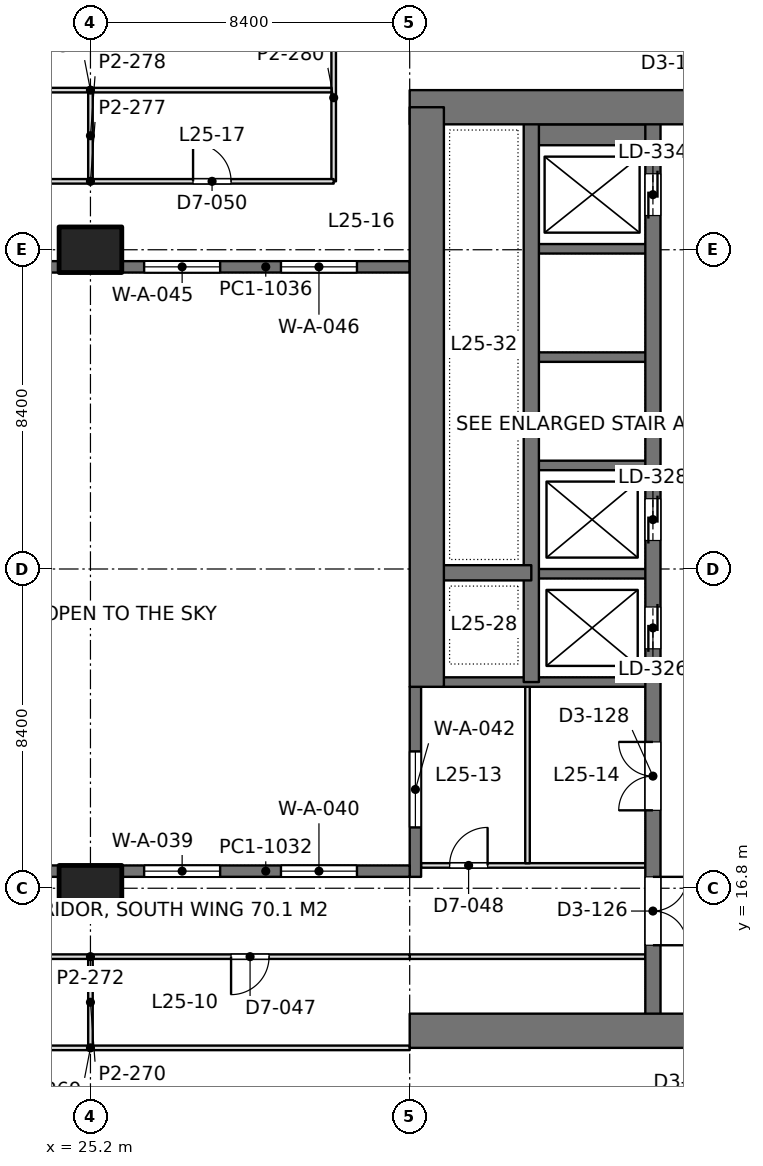
"""IFC4 building model, lengths in metres.
Left out: names, types, materials, properties, quantities, classifications, styles, units other than length and angle.
Written with IfcOpenShell. Run it as: python <this file> out.ifc"""

import sys

from ifc_helpers import new_model, si_unit, direction, frame, frame_2d, origin, origin_2d, place, context, subcontext, project, spatial, rectangle, extrude, element, fill, save


model = new_model("IFC4")
c1 = context("Model", 3, precision=1e-05, world=origin(), true_north=direction((0.0, 1.0)))
c2 = subcontext(c1, "Body", "Model", "MODEL_VIEW")
j1 = project(units=[si_unit("LENGTHUNIT", "METRE"), si_unit("PLANEANGLEUNIT", "RADIAN")], contexts=[c1])
p1 = place(None, origin())
s1 = spatial("IfcSite", under=j1, at=p1, CompositionType="ELEMENT")
p2 = place(p1, origin())
s2 = spatial("IfcBuilding", under=s1, at=p2, CompositionType="ELEMENT")
p3 = place(p2, frame((0.0, 0.0, 113.4)))
s3 = spatial("IfcBuildingStorey", under=s2, at=p3, CompositionType="ELEMENT", Elevation=113.4)
for number, where, z_axis, x_axis in (
    (1, (25.2, 16.8, 0.0), (0.0, 0.0, 1.0), (1.0, 0.0, 0.0)),
    (2, (25.2, 33.6, 0.0), (0.0, 0.0, 1.0), (1.0, 0.0, 0.0)),
):
    element("IfcColumn", number, at=place(p3, frame(where, z_axis=z_axis, x_axis=x_axis)), inside=s3, PredefinedType="COLUMN", context=c2, shape_type="SweptSolid", body=[
        extrude(rectangle(XDim=1.65, YDim=1.2, at=origin_2d()), origin(), (0.0, 0.0, 1.0), 4.2),
    ])
p4 = place(p3, frame((33.6, 13.05, 0.0), z_axis=(0.0, 0.0, 1.0), x_axis=(1.0, 0.0, 0.0)))
e3 = element("IfcWall", 3, at=p4, inside=s3, PredefinedType="SHEAR", context=c2, shape_type="SweptSolid", body=[
    extrude(rectangle(XDim=18.0, YDim=0.9, at=frame_2d((9.0, 0.0))), origin(), (0.0, 0.0, 1.0), 4.2),
])
p5 = place(p4, frame((7.25, 0.0, 0.0)))
e4 = element("IfcOpeningElement", 4, at=p5, cuts=e3, PredefinedType="OPENING", context=c2, shape_type="SweptSolid", body=[
    extrude(rectangle(XDim=1.8, YDim=2.4, at=frame_2d((0.9, 1.2))), frame((0.0, 0.46, 0.0), z_axis=(0.0, -1.0, 0.0), x_axis=(1.0, 0.0, 0.0)), (0.0, 0.0, 1.0), 0.92),
])
p6 = place(p3, frame((33.6, 37.35, 0.0), z_axis=(0.0, 0.0, 1.0), x_axis=(1.0, 0.0, 0.0)))
e5 = element("IfcWall", 5, at=p6, inside=s3, PredefinedType="SHEAR", context=c2, shape_type="SweptSolid", body=[
    extrude(rectangle(XDim=18.0, YDim=0.9, at=frame_2d((9.0, 0.0))), origin(), (0.0, 0.0, 1.0), 4.2),
])
p7 = place(p6, frame((7.25, 0.0, 0.0)))
e6 = element("IfcOpeningElement", 6, at=p7, cuts=e5, PredefinedType="OPENING", context=c2, shape_type="SweptSolid", body=[
    extrude(rectangle(XDim=1.8, YDim=2.4, at=frame_2d((0.9, 1.2))), frame((0.0, 0.46, 0.0), z_axis=(0.0, -1.0, 0.0), x_axis=(1.0, 0.0, 0.0)), (0.0, 0.0, 1.0), 0.92),
])
p8 = place(p3, frame((34.05, 22.1, 0.0), z_axis=(0.0, 0.0, 1.0), x_axis=(0.0, 1.0, 0.0)))
e7 = element("IfcWall", 7, at=p8, inside=s3, PredefinedType="SHEAR", context=c2, shape_type="SweptSolid", body=[
    extrude(rectangle(XDim=15.25, YDim=0.9, at=frame_2d((7.625, 0.0))), origin(), (0.0, 0.0, 1.0), 4.2),
])
p9 = place(p3, frame((40.0, 13.05, 0.0), z_axis=(0.0, 0.0, 1.0), x_axis=(0.0, 1.0, 0.0)))
e8 = element("IfcWall", 8, at=p9, inside=s3, PredefinedType="SHEAR", context=c2, shape_type="SweptSolid", body=[
    extrude(rectangle(XDim=24.3, YDim=0.4, at=frame_2d((12.15, 0.0))), origin(), (0.0, 0.0, 1.0), 4.2),
])
p10 = place(p9, frame((10.05, 0.0, 0.0)))
e9 = element("IfcOpeningElement", 9, at=p10, cuts=e8, PredefinedType="OPENING", context=c2, shape_type="SweptSolid", body=[
    extrude(rectangle(XDim=1.1, YDim=2.2, at=frame_2d((0.55, 1.1))), frame((0.0, 0.21, 0.0), z_axis=(0.0, -1.0, 0.0), x_axis=(1.0, 0.0, 0.0)), (0.0, 0.0, 1.0), 0.42),
])
p11 = place(p9, frame((12.9, 0.0, 0.0)))
e10 = element("IfcOpeningElement", 10, at=p11, cuts=e8, PredefinedType="OPENING", context=c2, shape_type="SweptSolid", body=[
    extrude(rectangle(XDim=1.1, YDim=2.2, at=frame_2d((0.55, 1.1))), frame((0.0, 0.21, 0.0), z_axis=(0.0, -1.0, 0.0), x_axis=(1.0, 0.0, 0.0)), (0.0, 0.0, 1.0), 0.42),
])
p12 = place(p9, frame((21.45, 0.0, 0.0)))
e11 = element("IfcOpeningElement", 11, at=p12, cuts=e8, PredefinedType="OPENING", context=c2, shape_type="SweptSolid", body=[
    extrude(rectangle(XDim=1.1, YDim=2.2, at=frame_2d((0.55, 1.1))), frame((0.0, 0.21, 0.0), z_axis=(0.0, -1.0, 0.0), x_axis=(1.0, 0.0, 0.0)), (0.0, 0.0, 1.0), 0.42),
])
p13 = place(p9, frame((2.25, 0.0, 0.0)))
e12 = element("IfcOpeningElement", 12, at=p13, cuts=e8, PredefinedType="OPENING", context=c2, shape_type="SweptSolid", body=[
    extrude(rectangle(XDim=1.8, YDim=2.4, at=frame_2d((0.9, 1.2))), frame((0.0, 0.21, 0.0), z_axis=(0.0, -1.0, 0.0), x_axis=(1.0, 0.0, 0.0)), (0.0, 0.0, 1.0), 0.42),
])
p14 = place(p9, frame((5.8, 0.0, 0.0)))
e13 = element("IfcOpeningElement", 13, at=p14, cuts=e8, PredefinedType="OPENING", context=c2, shape_type="SweptSolid", body=[
    extrude(rectangle(XDim=1.8, YDim=2.4, at=frame_2d((0.9, 1.2))), frame((0.0, 0.21, 0.0), z_axis=(0.0, -1.0, 0.0), x_axis=(1.0, 0.0, 0.0)), (0.0, 0.0, 1.0), 0.42),
])
p15 = place(p3, frame((36.8, 22.225, 0.0), z_axis=(0.0, 0.0, 1.0), x_axis=(0.0, 1.0, 0.0)))
e14 = element("IfcWall", 14, at=p15, inside=s3, PredefinedType="SHEAR", context=c2, shape_type="SweptSolid", body=[
    extrude(rectangle(XDim=15.125, YDim=0.4, at=frame_2d((7.562, 0.0))), origin(), (0.0, 0.0, 1.0), 4.2),
])
p16 = place(p3, frame((36.8, 25.1, 0.0), z_axis=(0.0, 0.0, 1.0), x_axis=(-1.0, 0.0, 0.0)))
e15 = element("IfcWall", 15, at=p16, inside=s3, PredefinedType="SHEAR", context=c2, shape_type="SweptSolid", body=[
    extrude(rectangle(XDim=2.75, YDim=0.4, at=frame_2d((1.375, 0.0))), origin(), (0.0, 0.0, 1.0), 4.2),
])
p17 = place(p3, frame((40.0, 22.225, 0.0), z_axis=(0.0, 0.0, 1.0), x_axis=(-1.0, 0.0, 0.0)))
e16 = element("IfcWall", 16, at=p17, inside=s3, PredefinedType="SHEAR", context=c2, shape_type="SweptSolid", body=[
    extrude(rectangle(XDim=5.95, YDim=0.25, at=frame_2d((2.975, 0.0))), origin(), (0.0, 0.0, 1.0), 4.2),
])
for number, where, z_axis, x_axis in (
    (17, (40.0, 25.075, 0.0), (0.0, 0.0, 1.0), (-1.0, 0.0, 0.0)),
    (18, (40.0, 27.925, 0.0), (0.0, 0.0, 1.0), (-1.0, 0.0, 0.0)),
    (19, (40.0, 30.775, 0.0), (0.0, 0.0, 1.0), (-1.0, 0.0, 0.0)),
    (20, (40.0, 33.625, 0.0), (0.0, 0.0, 1.0), (-1.0, 0.0, 0.0)),
):
    element("IfcWall", number, at=place(p3, frame(where, z_axis=z_axis, x_axis=x_axis)), inside=s3, PredefinedType="SHEAR", context=c2, shape_type="SweptSolid", body=[
        extrude(rectangle(XDim=3.2, YDim=0.25, at=frame_2d((1.6, 0.0))), origin(), (0.0, 0.0, 1.0), 4.2),
    ])
p18 = place(p3, frame((40.0, 36.625, 0.0), z_axis=(0.0, 0.0, 1.0), x_axis=(-1.0, 0.0, 0.0)))
e21 = element("IfcWall", 21, at=p18, inside=s3, PredefinedType="SHEAR", context=c2, shape_type="SweptSolid", body=[
    extrude(rectangle(XDim=3.2, YDim=0.55, at=frame_2d((1.6, 0.0))), origin(), (0.0, 0.0, 1.0), 4.2),
])
p19 = place(p3, frame((33.75, 17.1, 0.0), z_axis=(0.0, 0.0, 1.0), x_axis=(0.0, 1.0, 0.0)))
e22 = element("IfcWall", 22, at=p19, inside=s3, PredefinedType="SOLIDWALL", context=c2, shape_type="SweptSolid", body=[
    extrude(rectangle(XDim=5.0, YDim=0.3, at=frame_2d((2.5, 0.0))), origin(), (0.0, 0.0, 1.0), 4.05),
])
p20 = place(p19, frame((1.3, 0.0, 0.1)))
e23 = element("IfcOpeningElement", 23, at=p20, cuts=e22, PredefinedType="OPENING", context=c2, shape_type="SweptSolid", body=[
    extrude(rectangle(XDim=2.0, YDim=3.0, at=frame_2d((1.0, 1.5))), frame((0.0, 0.16, 0.0), z_axis=(0.0, -1.0, 0.0), x_axis=(1.0, 0.0, 0.0)), (0.0, 0.0, 1.0), 0.32),
])
p21 = place(p3, frame((16.8, 17.25, 0.0), z_axis=(0.0, 0.0, 1.0), x_axis=(1.0, 0.0, 0.0)))
e24 = element("IfcWall", 24, at=p21, inside=s3, PredefinedType="SOLIDWALL", context=c2, shape_type="SweptSolid", body=[
    extrude(rectangle(XDim=7.575, YDim=0.3, at=frame_2d((3.788, 0.0))), origin(), (0.0, 0.0, 1.0), 4.05),
])
p22 = place(p21, frame((0.988, 0.0, 0.1)))
e25 = element("IfcOpeningElement", 25, at=p22, cuts=e24, PredefinedType="OPENING", context=c2, shape_type="SweptSolid", body=[
    extrude(rectangle(XDim=2.0, YDim=3.0, at=frame_2d((1.0, 1.5))), frame((0.0, 0.16, 0.0), z_axis=(0.0, -1.0, 0.0), x_axis=(1.0, 0.0, 0.0)), (0.0, 0.0, 1.0), 0.32),
])
p23 = place(p21, frame((4.587, 0.0, 0.1)))
e26 = element("IfcOpeningElement", 26, at=p23, cuts=e24, PredefinedType="OPENING", context=c2, shape_type="SweptSolid", body=[
    extrude(rectangle(XDim=2.0, YDim=3.0, at=frame_2d((1.0, 1.5))), frame((0.0, 0.16, 0.0), z_axis=(0.0, -1.0, 0.0), x_axis=(1.0, 0.0, 0.0)), (0.0, 0.0, 1.0), 0.32),
])
p24 = place(p3, frame((26.025, 17.25, 0.0), z_axis=(0.0, 0.0, 1.0), x_axis=(1.0, 0.0, 0.0)))
e27 = element("IfcWall", 27, at=p24, inside=s3, PredefinedType="SOLIDWALL", context=c2, shape_type="SweptSolid", body=[
    extrude(rectangle(XDim=7.575, YDim=0.3, at=frame_2d((3.788, 0.0))), origin(), (0.0, 0.0, 1.0), 4.05),
])
p25 = place(p24, frame((0.587, 0.0, 0.1)))
e28 = element("IfcOpeningElement", 28, at=p25, cuts=e27, PredefinedType="OPENING", context=c2, shape_type="SweptSolid", body=[
    extrude(rectangle(XDim=2.0, YDim=3.0, at=frame_2d((1.0, 1.5))), frame((0.0, 0.16, 0.0), z_axis=(0.0, -1.0, 0.0), x_axis=(1.0, 0.0, 0.0)), (0.0, 0.0, 1.0), 0.32),
])
p26 = place(p24, frame((4.188, 0.0, 0.1)))
e29 = element("IfcOpeningElement", 29, at=p26, cuts=e27, PredefinedType="OPENING", context=c2, shape_type="SweptSolid", body=[
    extrude(rectangle(XDim=2.0, YDim=3.0, at=frame_2d((1.0, 1.5))), frame((0.0, 0.16, 0.0), z_axis=(0.0, -1.0, 0.0), x_axis=(1.0, 0.0, 0.0)), (0.0, 0.0, 1.0), 0.32),
])
p27 = place(p3, frame((16.8, 33.15, 0.0), z_axis=(0.0, 0.0, 1.0), x_axis=(1.0, 0.0, 0.0)))
e30 = element("IfcWall", 30, at=p27, inside=s3, PredefinedType="SOLIDWALL", context=c2, shape_type="SweptSolid", body=[
    extrude(rectangle(XDim=7.575, YDim=0.3, at=frame_2d((3.788, 0.0))), origin(), (0.0, 0.0, 1.0), 4.05),
])
p28 = place(p27, frame((0.988, 0.0, 0.1)))
e31 = element("IfcOpeningElement", 31, at=p28, cuts=e30, PredefinedType="OPENING", context=c2, shape_type="SweptSolid", body=[
    extrude(rectangle(XDim=2.0, YDim=3.0, at=frame_2d((1.0, 1.5))), frame((0.0, 0.16, 0.0), z_axis=(0.0, -1.0, 0.0), x_axis=(1.0, 0.0, 0.0)), (0.0, 0.0, 1.0), 0.32),
])
p29 = place(p27, frame((4.587, 0.0, 0.1)))
e32 = element("IfcOpeningElement", 32, at=p29, cuts=e30, PredefinedType="OPENING", context=c2, shape_type="SweptSolid", body=[
    extrude(rectangle(XDim=2.0, YDim=3.0, at=frame_2d((1.0, 1.5))), frame((0.0, 0.16, 0.0), z_axis=(0.0, -1.0, 0.0), x_axis=(1.0, 0.0, 0.0)), (0.0, 0.0, 1.0), 0.32),
])
p30 = place(p3, frame((26.025, 33.15, 0.0), z_axis=(0.0, 0.0, 1.0), x_axis=(1.0, 0.0, 0.0)))
e33 = element("IfcWall", 33, at=p30, inside=s3, PredefinedType="SOLIDWALL", context=c2, shape_type="SweptSolid", body=[
    extrude(rectangle(XDim=7.575, YDim=0.3, at=frame_2d((3.788, 0.0))), origin(), (0.0, 0.0, 1.0), 4.05),
])
p31 = place(p30, frame((0.587, 0.0, 0.1)))
e34 = element("IfcOpeningElement", 34, at=p31, cuts=e33, PredefinedType="OPENING", context=c2, shape_type="SweptSolid", body=[
    extrude(rectangle(XDim=2.0, YDim=3.0, at=frame_2d((1.0, 1.5))), frame((0.0, 0.16, 0.0), z_axis=(0.0, -1.0, 0.0), x_axis=(1.0, 0.0, 0.0)), (0.0, 0.0, 1.0), 0.32),
])
p32 = place(p30, frame((4.188, 0.0, 0.1)))
e35 = element("IfcOpeningElement", 35, at=p32, cuts=e33, PredefinedType="OPENING", context=c2, shape_type="SweptSolid", body=[
    extrude(rectangle(XDim=2.0, YDim=3.0, at=frame_2d((1.0, 1.5))), frame((0.0, 0.16, 0.0), z_axis=(0.0, -1.0, 0.0), x_axis=(1.0, 0.0, 0.0)), (0.0, 0.0, 1.0), 0.32),
])
p33 = place(p3, frame((33.898, 17.4, 0.0), z_axis=(0.0, 0.0, 1.0), x_axis=(1.0, 0.0, 0.0)))
e36 = element("IfcWall", 36, at=p33, inside=s3, PredefinedType="PARTITIONING", context=c2, shape_type="SweptSolid", body=[
    extrude(rectangle(XDim=5.904, YDim=0.12, at=frame_2d((2.952, 0.0))), origin(), (0.0, 0.0, 1.0), 3.55),
])
p34 = place(p33, frame((0.752, 0.0, 0.0)))
e37 = element("IfcOpeningElement", 37, at=p34, cuts=e36, PredefinedType="OPENING", context=c2, shape_type="SweptSolid", body=[
    extrude(rectangle(XDim=1.0, YDim=2.4, at=frame_2d((0.5, 1.2))), frame((0.0, 0.07, 0.0), z_axis=(0.0, -1.0, 0.0), x_axis=(1.0, 0.0, 0.0)), (0.0, 0.0, 1.0), 0.14),
])
p35 = place(p3, frame((36.7, 17.458, 0.0), z_axis=(0.0, 0.0, 1.0), x_axis=(0.0, 1.0, 0.0)))
e38 = element("IfcWall", 38, at=p35, inside=s3, PredefinedType="PARTITIONING", context=c2, shape_type="SweptSolid", body=[
    extrude(rectangle(XDim=4.644, YDim=0.12, at=frame_2d((2.322, 0.0))), origin(), (0.0, 0.0, 1.0), 3.6),
])
p36 = place(p3, frame((33.598, 15.0, 0.0), z_axis=(0.0, 0.0, 1.0), x_axis=(1.0, 0.0, 0.0)))
e39 = element("IfcWall", 39, at=p36, inside=s3, PredefinedType="PARTITIONING", context=c2, shape_type="SweptSolid", body=[
    extrude(rectangle(XDim=6.204, YDim=0.12, at=frame_2d((3.102, 0.0))), origin(), (0.0, 0.0, 1.0), 3.55),
])
p37 = place(p3, frame((25.2, 12.658, 0.0), z_axis=(0.0, 0.0, 1.0), x_axis=(0.0, 1.0, 0.0)))
e40 = element("IfcWall", 40, at=p37, inside=s3, PredefinedType="PARTITIONING", context=c2, shape_type="SweptSolid", body=[
    extrude(rectangle(XDim=2.284, YDim=0.12, at=frame_2d((1.142, 0.0))), origin(), (0.0, 0.0, 1.0), 3.55),
])
p38 = place(p3, frame((16.798, 15.0, 0.0), z_axis=(0.0, 0.0, 1.0), x_axis=(1.0, 0.0, 0.0)))
e41 = element("IfcWall", 41, at=p38, inside=s3, PredefinedType="PARTITIONING", context=c2, shape_type="SweptSolid", body=[
    extrude(rectangle(XDim=16.804, YDim=0.12, at=frame_2d((8.402, 0.0))), origin(), (0.0, 0.0, 1.0), 3.55),
])
p39 = place(p38, frame((3.702, 0.0, 0.0)))
e42 = element("IfcOpeningElement", 42, at=p39, cuts=e41, PredefinedType="OPENING", context=c2, shape_type="SweptSolid", body=[
    extrude(rectangle(XDim=1.0, YDim=2.4, at=frame_2d((0.5, 1.2))), frame((0.0, 0.07, 0.0), z_axis=(0.0, -1.0, 0.0), x_axis=(1.0, 0.0, 0.0)), (0.0, 0.0, 1.0), 0.14),
])
p40 = place(p38, frame((12.102, 0.0, 0.0)))
e43 = element("IfcOpeningElement", 43, at=p40, cuts=e41, PredefinedType="OPENING", context=c2, shape_type="SweptSolid", body=[
    extrude(rectangle(XDim=1.0, YDim=2.4, at=frame_2d((0.5, 1.2))), frame((0.0, 0.07, 0.0), z_axis=(0.0, -1.0, 0.0), x_axis=(1.0, 0.0, 0.0)), (0.0, 0.0, 1.0), 0.14),
])
p41 = place(p3, frame((16.8, 12.6, 0.0), z_axis=(0.0, 0.0, 1.0), x_axis=(1.0, 0.0, 0.0)))
e44 = element("IfcWall", 44, at=p41, inside=s3, PredefinedType="PARTITIONING", context=c2, shape_type="SweptSolid", body=[
    extrude(rectangle(XDim=16.8, YDim=0.12, at=frame_2d((8.4, 0.0))), origin(), (0.0, 0.0, 1.0), 3.55),
])
p42 = place(p3, frame((31.6, 35.4, 0.0), z_axis=(0.0, 0.0, 1.0), x_axis=(0.0, 1.0, 0.0)))
e45 = element("IfcWall", 45, at=p42, inside=s3, PredefinedType="PARTITIONING", context=c2, shape_type="SweptSolid", body=[
    extrude(rectangle(XDim=4.4, YDim=0.12, at=frame_2d((2.2, 0.0))), origin(), (0.0, 0.0, 1.0), 4.05),
])
p43 = place(p3, frame((25.2, 35.458, 0.0), z_axis=(0.0, 0.0, 1.0), x_axis=(0.0, 1.0, 0.0)))
e46 = element("IfcWall", 46, at=p43, inside=s3, PredefinedType="PARTITIONING", context=c2, shape_type="SweptSolid", body=[
    extrude(rectangle(XDim=2.284, YDim=0.12, at=frame_2d((1.142, 0.0))), origin(), (0.0, 0.0, 1.0), 3.55),
])
p44 = place(p3, frame((18.8, 35.4, 0.0), z_axis=(0.0, 0.0, 1.0), x_axis=(1.0, 0.0, 0.0)))
e47 = element("IfcWall", 47, at=p44, inside=s3, PredefinedType="PARTITIONING", context=c2, shape_type="SweptSolid", body=[
    extrude(rectangle(XDim=12.8, YDim=0.12, at=frame_2d((6.4, 0.0))), origin(), (0.0, 0.0, 1.0), 3.55),
])
p45 = place(p44, frame((2.7, 0.0, 0.0)))
e48 = element("IfcOpeningElement", 48, at=p45, cuts=e47, PredefinedType="OPENING", context=c2, shape_type="SweptSolid", body=[
    extrude(rectangle(XDim=1.0, YDim=2.4, at=frame_2d((0.5, 1.2))), frame((0.0, 0.07, 0.0), z_axis=(0.0, -1.0, 0.0), x_axis=(1.0, 0.0, 0.0)), (0.0, 0.0, 1.0), 0.14),
])
p46 = place(p44, frame((9.1, 0.0, 0.0)))
e49 = element("IfcOpeningElement", 49, at=p46, cuts=e47, PredefinedType="OPENING", context=c2, shape_type="SweptSolid", body=[
    extrude(rectangle(XDim=1.0, YDim=2.4, at=frame_2d((0.5, 1.2))), frame((0.0, 0.07, 0.0), z_axis=(0.0, -1.0, 0.0), x_axis=(1.0, 0.0, 0.0)), (0.0, 0.0, 1.0), 0.14),
])
p47 = place(p3, frame((18.858, 37.8, 0.0), z_axis=(0.0, 0.0, 1.0), x_axis=(1.0, 0.0, 0.0)))
e50 = element("IfcWall", 50, at=p47, inside=s3, PredefinedType="PARTITIONING", context=c2, shape_type="SweptSolid", body=[
    extrude(rectangle(XDim=12.684, YDim=0.12, at=frame_2d((6.342, 0.0))), origin(), (0.0, 0.0, 1.0), 3.55),
])
p48 = place(p20, origin())
e51 = element("IfcWindow", 51, at=p48, inside=s3, PartitioningType="SINGLE_PANEL", PredefinedType="WINDOW", context=c2, shape_type="SweptSolid", body=[
    extrude(rectangle(XDim=2.0, YDim=3.0, at=frame_2d((1.0, 1.5))), frame((0.0, 0.03, 0.0), z_axis=(0.0, -1.0, 0.0), x_axis=(1.0, 0.0, 0.0)), (0.0, 0.0, 1.0), 0.06),
])
fill(e23, e51)
p49 = place(p25, origin())
e52 = element("IfcWindow", 52, at=p49, inside=s3, PartitioningType="SINGLE_PANEL", PredefinedType="WINDOW", context=c2, shape_type="SweptSolid", body=[
    extrude(rectangle(XDim=2.0, YDim=3.0, at=frame_2d((1.0, 1.5))), frame((0.0, 0.03, 0.0), z_axis=(0.0, -1.0, 0.0), x_axis=(1.0, 0.0, 0.0)), (0.0, 0.0, 1.0), 0.06),
])
fill(e28, e52)
p50 = place(p26, origin())
e53 = element("IfcWindow", 53, at=p50, inside=s3, PartitioningType="SINGLE_PANEL", PredefinedType="WINDOW", context=c2, shape_type="SweptSolid", body=[
    extrude(rectangle(XDim=2.0, YDim=3.0, at=frame_2d((1.0, 1.5))), frame((0.0, 0.03, 0.0), z_axis=(0.0, -1.0, 0.0), x_axis=(1.0, 0.0, 0.0)), (0.0, 0.0, 1.0), 0.06),
])
fill(e29, e53)
p51 = place(p31, origin())
e54 = element("IfcWindow", 54, at=p51, inside=s3, PartitioningType="SINGLE_PANEL", PredefinedType="WINDOW", context=c2, shape_type="SweptSolid", body=[
    extrude(rectangle(XDim=2.0, YDim=3.0, at=frame_2d((1.0, 1.5))), frame((0.0, 0.03, 0.0), z_axis=(0.0, -1.0, 0.0), x_axis=(1.0, 0.0, 0.0)), (0.0, 0.0, 1.0), 0.06),
])
fill(e34, e54)
p52 = place(p32, origin())
e55 = element("IfcWindow", 55, at=p52, inside=s3, PartitioningType="SINGLE_PANEL", PredefinedType="WINDOW", context=c2, shape_type="SweptSolid", body=[
    extrude(rectangle(XDim=2.0, YDim=3.0, at=frame_2d((1.0, 1.5))), frame((0.0, 0.03, 0.0), z_axis=(0.0, -1.0, 0.0), x_axis=(1.0, 0.0, 0.0)), (0.0, 0.0, 1.0), 0.06),
])
fill(e35, e55)
p53 = place(p10, origin())
e56 = element("IfcDoor", 56, at=p53, inside=s3, OperationType="DOUBLE_DOOR_SLIDING", PredefinedType="DOOR", context=c2, shape_type="SweptSolid", body=[
    extrude(rectangle(XDim=1.1, YDim=2.2, at=frame_2d((0.55, 1.1))), frame((0.0, 0.025, 0.0), z_axis=(0.0, -1.0, 0.0), x_axis=(1.0, 0.0, 0.0)), (0.0, 0.0, 1.0), 0.05),
])
fill(e9, e56)
p54 = place(p11, origin())
e57 = element("IfcDoor", 57, at=p54, inside=s3, OperationType="DOUBLE_DOOR_SLIDING", PredefinedType="DOOR", context=c2, shape_type="SweptSolid", body=[
    extrude(rectangle(XDim=1.1, YDim=2.2, at=frame_2d((0.55, 1.1))), frame((0.0, 0.025, 0.0), z_axis=(0.0, -1.0, 0.0), x_axis=(1.0, 0.0, 0.0)), (0.0, 0.0, 1.0), 0.05),
])
fill(e10, e57)
p55 = place(p12, origin())
e58 = element("IfcDoor", 58, at=p55, inside=s3, OperationType="DOUBLE_DOOR_SLIDING", PredefinedType="DOOR", context=c2, shape_type="SweptSolid", body=[
    extrude(rectangle(XDim=1.1, YDim=2.2, at=frame_2d((0.55, 1.1))), frame((0.0, 0.025, 0.0), z_axis=(0.0, -1.0, 0.0), x_axis=(1.0, 0.0, 0.0)), (0.0, 0.0, 1.0), 0.05),
])
fill(e11, e58)
p56 = place(p13, frame((1.8, 0.0, 0.0), z_axis=(0.0, 0.0, 1.0), x_axis=(-1.0, 0.0, 0.0)))
e59 = element("IfcDoor", 59, at=p56, inside=s3, OperationType="DOUBLE_DOOR_SINGLE_SWING", PredefinedType="DOOR", context=c2, shape_type="SweptSolid", body=[
    extrude(rectangle(XDim=1.8, YDim=2.4, at=frame_2d((0.9, 1.2))), frame((0.0, 0.025, 0.0), z_axis=(0.0, -1.0, 0.0), x_axis=(1.0, 0.0, 0.0)), (0.0, 0.0, 1.0), 0.05),
])
fill(e12, e59)
p57 = place(p14, origin())
e60 = element("IfcDoor", 60, at=p57, inside=s3, OperationType="DOUBLE_DOOR_SINGLE_SWING", PredefinedType="DOOR", context=c2, shape_type="SweptSolid", body=[
    extrude(rectangle(XDim=1.8, YDim=2.4, at=frame_2d((0.9, 1.2))), frame((0.0, 0.025, 0.0), z_axis=(0.0, -1.0, 0.0), x_axis=(1.0, 0.0, 0.0)), (0.0, 0.0, 1.0), 0.05),
])
fill(e13, e60)
p58 = place(p34, origin())
e61 = element("IfcDoor", 61, at=p58, inside=s3, OperationType="SINGLE_SWING_RIGHT", PredefinedType="DOOR", context=c2, shape_type="SweptSolid", body=[
    extrude(rectangle(XDim=1.0, YDim=2.4, at=frame_2d((0.5, 1.2))), frame((0.0, 0.025, 0.0), z_axis=(0.0, -1.0, 0.0), x_axis=(1.0, 0.0, 0.0)), (0.0, 0.0, 1.0), 0.05),
])
fill(e37, e61)
p59 = place(p40, frame((1.0, 0.0, 0.0), z_axis=(0.0, 0.0, 1.0), x_axis=(-1.0, 0.0, 0.0)))
e62 = element("IfcDoor", 62, at=p59, inside=s3, OperationType="SINGLE_SWING_RIGHT", PredefinedType="DOOR", context=c2, shape_type="SweptSolid", body=[
    extrude(rectangle(XDim=1.0, YDim=2.4, at=frame_2d((0.5, 1.2))), frame((0.0, 0.025, 0.0), z_axis=(0.0, -1.0, 0.0), x_axis=(1.0, 0.0, 0.0)), (0.0, 0.0, 1.0), 0.05),
])
fill(e43, e62)
p60 = place(p46, origin())
e63 = element("IfcDoor", 63, at=p60, inside=s3, OperationType="SINGLE_SWING_LEFT", PredefinedType="DOOR", context=c2, shape_type="SweptSolid", body=[
    extrude(rectangle(XDim=1.0, YDim=2.4, at=frame_2d((0.5, 1.2))), frame((0.0, 0.025, 0.0), z_axis=(0.0, -1.0, 0.0), x_axis=(1.0, 0.0, 0.0)), (0.0, 0.0, 1.0), 0.05),
])
fill(e49, e63)
save(model, sys.argv[1])
